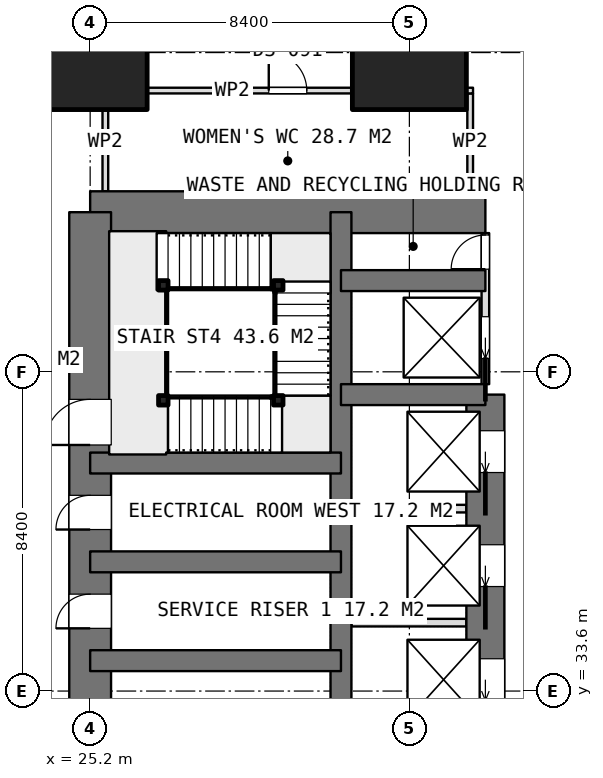
"""IFC4 building model, lengths in metres.
Left out: names, types, materials, properties, quantities, classifications, styles, units other than length and angle.
Written with IfcOpenShell. Run it as: python <this file> out.ifc"""

import sys

from ifc_helpers import new_model, si_unit, direction, frame, frame_2d, origin, origin_2d, place, context, subcontext, project, spatial, rectangle, extrude, element, fill, save


model = new_model("IFC4")
c1 = context("Model", 3, precision=1e-05, world=origin(), true_north=direction((0.0, 1.0)))
c2 = subcontext(c1, "Body", "Model", "MODEL_VIEW")
j1 = project(units=[si_unit("LENGTHUNIT", "METRE"), si_unit("PLANEANGLEUNIT", "RADIAN")], contexts=[c1])
p1 = place(None, origin())
s1 = spatial("IfcSite", under=j1, at=p1, CompositionType="ELEMENT")
p2 = place(p1, origin())
s2 = spatial("IfcBuilding", under=s1, at=p2, CompositionType="ELEMENT")
p3 = place(p2, frame((0.0, 0.0, 81.65)))
s3 = spatial("IfcBuildingStorey", under=s2, at=p3, CompositionType="ELEMENT", Elevation=81.65)
p4 = place(p3, frame((25.2, 46.2, 0.0), z_axis=(0.0, 0.0, 1.0), x_axis=(1.0, 0.0, 0.0)))
e1 = element("IfcWall", 1, at=p4, inside=s3, PredefinedType="SHEAR", context=c2, shape_type="SweptSolid", body=[
    extrude(rectangle(XDim=10.4, YDim=1.1, at=frame_2d((5.2, 0.0))), origin(), (0.0, 0.0, 1.0), 3.75),
])
p5 = place(p3, frame((25.2, 21.0, 0.0), z_axis=(0.0, 0.0, 1.0), x_axis=(0.0, 1.0, 0.0)))
e2 = element("IfcWall", 2, at=p5, inside=s3, PredefinedType="SHEAR", context=c2, shape_type="SweptSolid", body=[
    extrude(rectangle(XDim=25.2, YDim=1.1, at=frame_2d((12.6, 0.0))), origin(), (0.0, 0.0, 1.0), 3.75),
])
p6 = place(p5, frame((7.8, 0.0, 0.0)))
e3 = element("IfcOpeningElement", 3, at=p6, cuts=e2, PredefinedType="OPENING", context=c2, shape_type="SweptSolid", body=[
    extrude(rectangle(XDim=1.2, YDim=2.1, at=frame_2d((0.6, 1.05))), frame((0.0, 0.56, 0.0), z_axis=(0.0, -1.0, 0.0), x_axis=(1.0, 0.0, 0.0)), (0.0, 0.0, 1.0), 1.12),
])
p7 = place(p5, frame((14.25, 0.0, 0.0)))
e4 = element("IfcOpeningElement", 4, at=p7, cuts=e2, PredefinedType="OPENING", context=c2, shape_type="SweptSolid", body=[
    extrude(rectangle(XDim=0.9, YDim=2.1, at=frame_2d((0.45, 1.05))), frame((0.0, 0.56, 0.0), z_axis=(0.0, -1.0, 0.0), x_axis=(1.0, 0.0, 0.0)), (0.0, 0.0, 1.0), 1.12),
])
p8 = place(p5, frame((16.85, 0.0, 0.0)))
e5 = element("IfcOpeningElement", 5, at=p8, cuts=e2, PredefinedType="OPENING", context=c2, shape_type="SweptSolid", body=[
    extrude(rectangle(XDim=0.9, YDim=2.1, at=frame_2d((0.45, 1.05))), frame((0.0, 0.56, 0.0), z_axis=(0.0, -1.0, 0.0), x_axis=(1.0, 0.0, 0.0)), (0.0, 0.0, 1.0), 1.12),
])
p9 = place(p5, frame((19.075, 0.0, 0.0)))
e6 = element("IfcOpeningElement", 6, at=p9, cuts=e2, PredefinedType="OPENING", context=c2, shape_type="SweptSolid", body=[
    extrude(rectangle(XDim=1.2, YDim=2.1, at=frame_2d((0.6, 1.05))), frame((0.0, 0.56, 0.0), z_axis=(0.0, -1.0, 0.0), x_axis=(1.0, 0.0, 0.0)), (0.0, 0.0, 1.0), 1.12),
])
p10 = place(p3, frame((31.8, 21.0, 0.0), z_axis=(0.0, 0.0, 1.0), x_axis=(0.0, 1.0, 0.0)))
e7 = element("IfcWall", 7, at=p10, inside=s3, PredefinedType="SHEAR", context=c2, shape_type="SweptSolid", body=[
    extrude(rectangle(XDim=25.2, YDim=0.55, at=frame_2d((12.6, 0.0))), origin(), (0.0, 0.0, 1.0), 3.75),
])
p11 = place(p3, frame((35.6, 23.4, 0.0), z_axis=(0.0, 0.0, 1.0), x_axis=(0.0, 1.0, 0.0)))
e8 = element("IfcWall", 8, at=p11, inside=s3, PredefinedType="SHEAR", context=c2, shape_type="SweptSolid", body=[
    extrude(rectangle(XDim=18.0, YDim=1.0, at=frame_2d((9.0, 0.0))), origin(), (0.0, 0.0, 1.0), 3.75),
])
p12 = place(p11, frame((0.95, 0.0, 0.0)))
e9 = element("IfcOpeningElement", 9, at=p12, cuts=e8, PredefinedType="OPENING", context=c2, shape_type="SweptSolid", body=[
    extrude(rectangle(XDim=1.1, YDim=2.1, at=frame_2d((0.55, 1.05))), frame((0.0, 0.51, 0.0), z_axis=(0.0, -1.0, 0.0), x_axis=(1.0, 0.0, 0.0)), (0.0, 0.0, 1.0), 1.02),
])
p13 = place(p11, frame((3.95, 0.0, 0.0)))
e10 = element("IfcOpeningElement", 10, at=p13, cuts=e8, PredefinedType="OPENING", context=c2, shape_type="SweptSolid", body=[
    extrude(rectangle(XDim=1.1, YDim=2.1, at=frame_2d((0.55, 1.05))), frame((0.0, 0.51, 0.0), z_axis=(0.0, -1.0, 0.0), x_axis=(1.0, 0.0, 0.0)), (0.0, 0.0, 1.0), 1.02),
])
p14 = place(p11, frame((6.95, 0.0, 0.0)))
e11 = element("IfcOpeningElement", 11, at=p14, cuts=e8, PredefinedType="OPENING", context=c2, shape_type="SweptSolid", body=[
    extrude(rectangle(XDim=1.1, YDim=2.1, at=frame_2d((0.55, 1.05))), frame((0.0, 0.51, 0.0), z_axis=(0.0, -1.0, 0.0), x_axis=(1.0, 0.0, 0.0)), (0.0, 0.0, 1.0), 1.02),
])
p15 = place(p11, frame((9.95, 0.0, 0.0)))
e12 = element("IfcOpeningElement", 12, at=p15, cuts=e8, PredefinedType="OPENING", context=c2, shape_type="SweptSolid", body=[
    extrude(rectangle(XDim=1.1, YDim=2.1, at=frame_2d((0.55, 1.05))), frame((0.0, 0.51, 0.0), z_axis=(0.0, -1.0, 0.0), x_axis=(1.0, 0.0, 0.0)), (0.0, 0.0, 1.0), 1.02),
])
p16 = place(p11, frame((12.95, 0.0, 0.0)))
e13 = element("IfcOpeningElement", 13, at=p16, cuts=e8, PredefinedType="OPENING", context=c2, shape_type="SweptSolid", body=[
    extrude(rectangle(XDim=1.1, YDim=2.1, at=frame_2d((0.55, 1.05))), frame((0.0, 0.51, 0.0), z_axis=(0.0, -1.0, 0.0), x_axis=(1.0, 0.0, 0.0)), (0.0, 0.0, 1.0), 1.02),
])
p17 = place(p11, frame((15.95, 0.0, 0.0)))
e14 = element("IfcOpeningElement", 14, at=p17, cuts=e8, PredefinedType="OPENING", context=c2, shape_type="SweptSolid", body=[
    extrude(rectangle(XDim=1.1, YDim=2.1, at=frame_2d((0.55, 1.05))), frame((0.0, 0.51, 0.0), z_axis=(0.0, -1.0, 0.0), x_axis=(1.0, 0.0, 0.0)), (0.0, 0.0, 1.0), 1.02),
])
for number, where, z_axis, x_axis in (
    (15, (31.8, 41.4, 0.0), (0.0, 0.0, 1.0), (1.0, 0.0, 0.0)),
    (16, (31.8, 44.4, 0.0), (0.0, 0.0, 1.0), (1.0, 0.0, 0.0)),
):
    element("IfcWall", number, at=place(p3, frame(where, z_axis=z_axis, x_axis=x_axis)), inside=s3, PredefinedType="SHEAR", context=c2, shape_type="SweptSolid", body=[
        extrude(rectangle(XDim=3.8, YDim=0.55, at=frame_2d((1.9, 0.0))), origin(), (0.0, 0.0, 1.0), 3.75),
    ])
for number, where, z_axis, x_axis in (
    (17, (25.2, 34.4, 0.0), (0.0, 0.0, 1.0), (1.0, 0.0, 0.0)),
    (18, (25.2, 37.0, 0.0), (0.0, 0.0, 1.0), (1.0, 0.0, 0.0)),
    (19, (25.2, 39.6, 0.0), (0.0, 0.0, 1.0), (1.0, 0.0, 0.0)),
):
    element("IfcWall", number, at=place(p3, frame(where, z_axis=z_axis, x_axis=x_axis)), inside=s3, PredefinedType="SHEAR", context=c2, shape_type="SweptSolid", body=[
        extrude(rectangle(XDim=6.6, YDim=0.55, at=frame_2d((3.3, 0.0))), origin(), (0.0, 0.0, 1.0), 3.75),
    ])
for number, where, z_axis, x_axis in (
    (20, (25.2, 50.4, 0.0), (0.0, 0.0, 1.0), (1.0, 0.0, 0.0)),
    (21, (33.6, 50.4, 0.0), (0.0, 0.0, 1.0), (1.0, 0.0, 0.0)),
):
    element("IfcColumn", number, at=place(p3, frame(where, z_axis=z_axis, x_axis=x_axis)), inside=s3, PredefinedType="COLUMN", context=c2, shape_type="SweptSolid", body=[
        extrude(rectangle(XDim=3.0, YDim=3.0, at=origin_2d()), origin(), (0.0, 0.0, 1.0), 3.75),
    ])
for number, where, z_axis, x_axis in (
    (22, (32.075, 35.4, 0.0), (0.0, 0.0, 1.0), (1.0, 0.0, 0.0)),
    (23, (32.075, 38.4, 0.0), (0.0, 0.0, 1.0), (1.0, 0.0, 0.0)),
):
    element("IfcWall", number, at=place(p3, frame(where, z_axis=z_axis, x_axis=x_axis)), inside=s3, PredefinedType="PARTITIONING", context=c2, shape_type="SweptSolid", body=[
        extrude(rectangle(XDim=3.025, YDim=0.2, at=frame_2d((1.513, 0.0))), origin(), (0.0, 0.0, 1.0), 3.4),
    ])
p18 = place(p3, frame((35.6, 41.675, 0.0), z_axis=(0.0, 0.0, 1.0), x_axis=(0.0, 1.0, 0.0)))
e24 = element("IfcWall", 24, at=p18, inside=s3, PredefinedType="PARTITIONING", context=c2, shape_type="SweptSolid", body=[
    extrude(rectangle(XDim=3.975, YDim=0.2, at=frame_2d((1.987, 0.0))), origin(), (0.0, 0.0, 1.0), 3.4),
])
p19 = place(p18, frame((3.025, 0.0, 0.0)))
e25 = element("IfcOpeningElement", 25, at=p19, cuts=e24, PredefinedType="OPENING", context=c2, shape_type="SweptSolid", body=[
    extrude(rectangle(XDim=0.9, YDim=2.1, at=frame_2d((0.45, 1.05))), frame((0.0, 0.11, 0.0), z_axis=(0.0, -1.0, 0.0), x_axis=(1.0, 0.0, 0.0)), (0.0, 0.0, 1.0), 0.22),
])
p20 = place(p18, frame((0.675, 0.0, 0.0)))
e26 = element("IfcOpeningElement", 26, at=p20, cuts=e24, PredefinedType="OPENING", context=c2, shape_type="SweptSolid", body=[
    extrude(rectangle(XDim=1.1, YDim=2.1, at=frame_2d((0.55, 1.05))), frame((0.0, 0.11, 0.0), z_axis=(0.0, -1.0, 0.0), x_axis=(1.0, 0.0, 0.0)), (0.0, 0.0, 1.0), 0.22),
])
p21 = place(p3, frame((25.525, 49.4, 0.0), z_axis=(0.0, 0.0, 1.0), x_axis=(1.0, 0.0, 0.0)))
e27 = element("IfcWall", 27, at=p21, inside=s3, PredefinedType="PARTITIONING", context=c2, shape_type="SweptSolid", body=[
    extrude(rectangle(XDim=9.75, YDim=0.15, at=frame_2d((4.875, 0.0))), origin(), (0.0, 0.0, 1.0), 3.4),
])
p22 = place(p21, frame((4.375, 0.0, 0.0)))
e28 = element("IfcOpeningElement", 28, at=p22, cuts=e27, PredefinedType="OPENING", context=c2, shape_type="SweptSolid", body=[
    extrude(rectangle(XDim=1.0, YDim=2.1, at=frame_2d((0.5, 1.05))), frame((0.0, 0.085, 0.0), z_axis=(0.0, -1.0, 0.0), x_axis=(1.0, 0.0, 0.0)), (0.0, 0.0, 1.0), 0.17),
])
for number, where, z_axis, x_axis in (
    (29, (25.6, 46.75, 0.0), (0.0, 0.0, 1.0), (0.0, 1.0, 0.0)),
    (30, (35.2, 46.75, 0.0), (0.0, 0.0, 1.0), (0.0, 1.0, 0.0)),
):
    element("IfcWall", number, at=place(p3, frame(where, z_axis=z_axis, x_axis=x_axis)), inside=s3, PredefinedType="PARTITIONING", context=c2, shape_type="SweptSolid", body=[
        extrude(rectangle(XDim=2.575, YDim=0.15, at=frame_2d((1.288, 0.0))), origin(), (0.0, 0.0, 1.0), 3.4),
    ])
for number, where, z_axis, x_axis in (
    (31, (27.125, 41.25, 0.0), (0.0, 0.0, 1.0), (1.0, 0.0, 0.0)),
    (32, (30.15, 41.25, 0.0), (0.0, 0.0, 1.0), (1.0, 0.0, 0.0)),
    (33, (30.15, 44.275, 0.0), (0.0, 0.0, 1.0), (1.0, 0.0, 0.0)),
    (34, (27.125, 44.275, 0.0), (0.0, 0.0, 1.0), (1.0, 0.0, 0.0)),
):
    element("IfcColumn", number, at=place(p3, frame(where, z_axis=z_axis, x_axis=x_axis)), inside=s3, PredefinedType="COLUMN", context=c2, shape_type="SweptSolid", body=[
        extrude(rectangle(XDim=0.25, YDim=0.25, at=origin_2d()), origin(), (0.0, 0.0, 1.0), 3.75),
    ])
p23 = place(p7, origin())
e35 = element("IfcDoor", 35, at=p23, inside=s3, OperationType="SINGLE_SWING_LEFT", PredefinedType="DOOR", context=c2, shape_type="SweptSolid", body=[
    extrude(rectangle(XDim=0.9, YDim=2.1, at=frame_2d((0.45, 1.05))), frame((0.0, 0.025, 0.0), z_axis=(0.0, -1.0, 0.0), x_axis=(1.0, 0.0, 0.0)), (0.0, 0.0, 1.0), 0.05),
])
fill(e4, e35)
p24 = place(p8, origin())
e36 = element("IfcDoor", 36, at=p24, inside=s3, OperationType="SINGLE_SWING_LEFT", PredefinedType="DOOR", context=c2, shape_type="SweptSolid", body=[
    extrude(rectangle(XDim=0.9, YDim=2.1, at=frame_2d((0.45, 1.05))), frame((0.0, 0.025, 0.0), z_axis=(0.0, -1.0, 0.0), x_axis=(1.0, 0.0, 0.0)), (0.0, 0.0, 1.0), 0.05),
])
fill(e5, e36)
p25 = place(p19, origin())
e37 = element("IfcDoor", 37, at=p25, inside=s3, OperationType="SINGLE_SWING_LEFT", PredefinedType="DOOR", context=c2, shape_type="SweptSolid", body=[
    extrude(rectangle(XDim=0.9, YDim=2.1, at=frame_2d((0.45, 1.05))), frame((0.0, 0.025, 0.0), z_axis=(0.0, -1.0, 0.0), x_axis=(1.0, 0.0, 0.0)), (0.0, 0.0, 1.0), 0.05),
])
fill(e25, e37)
p26 = place(p15, origin())
e38 = element("IfcDoor", 38, at=p26, inside=s3, OperationType="SLIDING_TO_LEFT", PredefinedType="USERDEFINED", context=c2, shape_type="SweptSolid", body=[
    extrude(rectangle(XDim=1.1, YDim=2.1, at=frame_2d((0.55, 1.05))), frame((0.0, 0.025, 0.0), z_axis=(0.0, -1.0, 0.0), x_axis=(1.0, 0.0, 0.0)), (0.0, 0.0, 1.0), 0.05),
])
fill(e12, e38)
p27 = place(p16, origin())
e39 = element("IfcDoor", 39, at=p27, inside=s3, OperationType="SLIDING_TO_LEFT", PredefinedType="USERDEFINED", context=c2, shape_type="SweptSolid", body=[
    extrude(rectangle(XDim=1.1, YDim=2.1, at=frame_2d((0.55, 1.05))), frame((0.0, 0.025, 0.0), z_axis=(0.0, -1.0, 0.0), x_axis=(1.0, 0.0, 0.0)), (0.0, 0.0, 1.0), 0.05),
])
fill(e13, e39)
p28 = place(p17, origin())
e40 = element("IfcDoor", 40, at=p28, inside=s3, OperationType="SLIDING_TO_LEFT", PredefinedType="USERDEFINED", context=c2, shape_type="SweptSolid", body=[
    extrude(rectangle(XDim=1.1, YDim=2.1, at=frame_2d((0.55, 1.05))), frame((0.0, 0.025, 0.0), z_axis=(0.0, -1.0, 0.0), x_axis=(1.0, 0.0, 0.0)), (0.0, 0.0, 1.0), 0.05),
])
fill(e14, e40)
p29 = place(p20, origin())
e41 = element("IfcDoor", 41, at=p29, inside=s3, OperationType="SLIDING_TO_LEFT", PredefinedType="USERDEFINED", context=c2, shape_type="SweptSolid", body=[
    extrude(rectangle(XDim=1.1, YDim=2.1, at=frame_2d((0.55, 1.05))), frame((0.0, 0.025, 0.0), z_axis=(0.0, -1.0, 0.0), x_axis=(1.0, 0.0, 0.0)), (0.0, 0.0, 1.0), 0.05),
])
fill(e26, e41)
p30 = place(p22, origin())
e42 = element("IfcDoor", 42, at=p30, inside=s3, OperationType="SINGLE_SWING_LEFT", PredefinedType="DOOR", context=c2, shape_type="SweptSolid", body=[
    extrude(rectangle(XDim=1.0, YDim=2.1, at=frame_2d((0.5, 1.05))), frame((0.0, 0.025, 0.0), z_axis=(0.0, -1.0, 0.0), x_axis=(1.0, 0.0, 0.0)), (0.0, 0.0, 1.0), 0.05),
])
fill(e28, e42)
p31 = place(p9, origin())
e43 = element("IfcDoor", 43, at=p31, inside=s3, OperationType="SINGLE_SWING_RIGHT", PredefinedType="DOOR", context=c2, shape_type="SweptSolid", body=[
    extrude(rectangle(XDim=1.2, YDim=2.1, at=frame_2d((0.6, 1.05))), frame((0.0, 0.025, 0.0), z_axis=(0.0, -1.0, 0.0), x_axis=(1.0, 0.0, 0.0)), (0.0, 0.0, 1.0), 0.05),
])
fill(e6, e43)
save(model, sys.argv[1])
